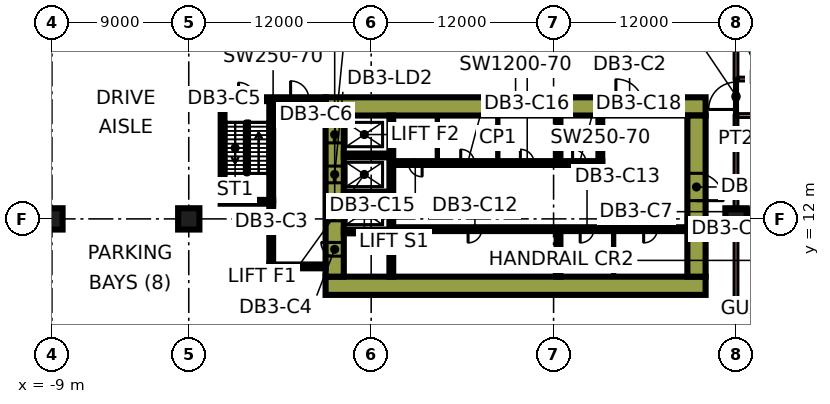
"""IFC4 building model, lengths in metres.
Left out: names, types, materials, properties, quantities, classifications, styles, units other than length and angle.
Written with IfcOpenShell. Run it as: python <this file> out.ifc"""

import sys

from ifc_helpers import new_model, si_unit, direction, frame, frame_2d, origin, origin_2d, place, context, subcontext, project, spatial, rectangle, extrude, element, fill, save


model = new_model("IFC4")
c1 = context("Model", 3, precision=1e-05, world=origin(), true_north=direction((0.0, 1.0)))
c2 = subcontext(c1, "Body", "Model", "MODEL_VIEW")
j1 = project(units=[si_unit("LENGTHUNIT", "METRE"), si_unit("PLANEANGLEUNIT", "RADIAN")], contexts=[c1])
p1 = place(None, origin())
s1 = spatial("IfcSite", under=j1, at=p1, CompositionType="ELEMENT")
p2 = place(p1, origin())
s2 = spatial("IfcBuilding", under=s1, at=p2, CompositionType="ELEMENT")
p3 = place(p2, frame((0.0, 0.0, -13.5)))
s3 = spatial("IfcBuildingStorey", under=s2, at=p3, CompositionType="ELEMENT", Elevation=-13.5)
for number, where, z_axis, x_axis in (
    (1, (-9.0, 12.0, 0.0), (0.0, 0.0, 1.0), (1.0, 0.0, 0.0)),
    (2, (0.0, 12.0, 0.0), (0.0, 0.0, 1.0), (1.0, 0.0, 0.0)),
    (3, (36.0, 12.0, 0.0), (0.0, 0.0, 1.0), (1.0, 0.0, 0.0)),
):
    element("IfcColumn", number, at=place(p3, frame(where, z_axis=z_axis, x_axis=x_axis)), inside=s3, PredefinedType="COLUMN", context=c2, shape_type="SweptSolid", body=[
        extrude(rectangle(XDim=1.4, YDim=1.4, at=origin_2d()), origin(), (0.0, 0.0, 1.0), 4.5),
    ])
p4 = place(p3, frame((9.0, 7.6, 0.0), z_axis=(0.0, 0.0, 1.0), x_axis=(1.0, 0.0, 0.0)))
e4 = element("IfcWall", 4, at=p4, inside=s3, PredefinedType="SHEAR", context=c2, shape_type="SweptSolid", body=[
    extrude(rectangle(XDim=25.0, YDim=1.2, at=frame_2d((12.5, 0.0))), origin(), (0.0, 0.0, 1.0), 4.5),
])
p5 = place(p3, frame((9.0, 19.4, 0.0), z_axis=(0.0, 0.0, 1.0), x_axis=(1.0, 0.0, 0.0)))
e5 = element("IfcWall", 5, at=p5, inside=s3, PredefinedType="SHEAR", context=c2, shape_type="SweptSolid", body=[
    extrude(rectangle(XDim=25.0, YDim=1.2, at=frame_2d((12.5, 0.0))), origin(), (0.0, 0.0, 1.0), 4.5),
])
p6 = place(p5, frame((19.1, 0.0, 0.0)))
e6 = element("IfcOpeningElement", 6, at=p6, cuts=e5, PredefinedType="OPENING", context=c2, shape_type="SweptSolid", body=[
    extrude(rectangle(XDim=1.8, YDim=2.4, at=frame_2d((0.9, 1.2))), frame((0.0, 0.61, 0.0), z_axis=(0.0, -1.0, 0.0), x_axis=(1.0, 0.0, 0.0)), (0.0, 0.0, 1.0), 1.22),
])
p7 = place(p3, frame((9.6, 8.2, 0.0), z_axis=(0.0, 0.0, 1.0), x_axis=(0.0, 1.0, 0.0)))
e7 = element("IfcWall", 7, at=p7, inside=s3, PredefinedType="SHEAR", context=c2, shape_type="SweptSolid", body=[
    extrude(rectangle(XDim=10.6, YDim=1.2, at=frame_2d((5.3, 0.0))), origin(), (0.0, 0.0, 1.0), 4.5),
])
p8 = place(p7, frame((3.675, 0.0, 0.0)))
e8 = element("IfcOpeningElement", 8, at=p8, cuts=e7, PredefinedType="OPENING", context=c2, shape_type="SweptSolid", body=[
    extrude(rectangle(XDim=1.1, YDim=2.2, at=frame_2d((0.55, 1.1))), frame((0.0, 0.61, 0.0), z_axis=(0.0, -1.0, 0.0), x_axis=(1.0, 0.0, 0.0)), (0.0, 0.0, 1.0), 1.22),
])
p9 = place(p7, frame((6.175, 0.0, 0.0)))
e9 = element("IfcOpeningElement", 9, at=p9, cuts=e7, PredefinedType="OPENING", context=c2, shape_type="SweptSolid", body=[
    extrude(rectangle(XDim=1.1, YDim=2.2, at=frame_2d((0.55, 1.1))), frame((0.0, 0.61, 0.0), z_axis=(0.0, -1.0, 0.0), x_axis=(1.0, 0.0, 0.0)), (0.0, 0.0, 1.0), 1.22),
])
p10 = place(p7, frame((8.8, 0.0, 0.0)))
e10 = element("IfcOpeningElement", 10, at=p10, cuts=e7, PredefinedType="OPENING", context=c2, shape_type="SweptSolid", body=[
    extrude(rectangle(XDim=1.1, YDim=2.2, at=frame_2d((0.55, 1.1))), frame((0.0, 0.61, 0.0), z_axis=(0.0, -1.0, 0.0), x_axis=(1.0, 0.0, 0.0)), (0.0, 0.0, 1.0), 1.22),
])
p11 = place(p7, frame((1.35, 0.0, 0.0)))
e11 = element("IfcOpeningElement", 11, at=p11, cuts=e7, PredefinedType="OPENING", context=c2, shape_type="SweptSolid", body=[
    extrude(rectangle(XDim=0.9, YDim=2.1, at=frame_2d((0.45, 1.05))), frame((0.0, 0.61, 0.0), z_axis=(0.0, -1.0, 0.0), x_axis=(1.0, 0.0, 0.0)), (0.0, 0.0, 1.0), 1.22),
])
p12 = place(p3, frame((33.4, 8.2, 0.0), z_axis=(0.0, 0.0, 1.0), x_axis=(0.0, 1.0, 0.0)))
e12 = element("IfcWall", 12, at=p12, inside=s3, PredefinedType="SHEAR", context=c2, shape_type="SweptSolid", body=[
    extrude(rectangle(XDim=10.6, YDim=1.2, at=frame_2d((5.3, 0.0))), origin(), (0.0, 0.0, 1.0), 4.5),
])
p13 = place(p12, frame((5.0, 0.0, 0.0)))
e13 = element("IfcOpeningElement", 13, at=p13, cuts=e12, PredefinedType="OPENING", context=c2, shape_type="SweptSolid", body=[
    extrude(rectangle(XDim=1.8, YDim=2.4, at=frame_2d((0.9, 1.2))), frame((0.0, 0.61, 0.0), z_axis=(0.0, -1.0, 0.0), x_axis=(1.0, 0.0, 0.0)), (0.0, 0.0, 1.0), 1.22),
])
p14 = place(p3, frame((13.325, 8.2, 0.0), z_axis=(0.0, 0.0, 1.0), x_axis=(0.0, 1.0, 0.0)))
e14 = element("IfcWall", 14, at=p14, inside=s3, PredefinedType="SHEAR", context=c2, shape_type="SweptSolid", body=[
    extrude(rectangle(XDim=10.6, YDim=0.25, at=frame_2d((5.3, 0.0))), origin(), (0.0, 0.0, 1.0), 4.5),
])
p15 = place(p3, frame((13.45, 11.325, 0.0), z_axis=(0.0, 0.0, 1.0), x_axis=(1.0, 0.0, 0.0)))
e15 = element("IfcWall", 15, at=p15, inside=s3, PredefinedType="SHEAR", context=c2, shape_type="SweptSolid", body=[
    extrude(rectangle(XDim=19.35, YDim=0.25, at=frame_2d((9.675, 0.0))), origin(), (0.0, 0.0, 1.0), 4.5),
])
p16 = place(p15, frame((4.925, 0.0, 0.0)))
e16 = element("IfcOpeningElement", 16, at=p16, cuts=e15, PredefinedType="OPENING", context=c2, shape_type="SweptSolid", body=[
    extrude(rectangle(XDim=0.9, YDim=2.1, at=frame_2d((0.45, 1.05))), frame((0.0, 0.135, 0.0), z_axis=(0.0, -1.0, 0.0), x_axis=(1.0, 0.0, 0.0)), (0.0, 0.0, 1.0), 0.27),
])
p17 = place(p15, frame((12.3, 0.0, 0.0)))
e17 = element("IfcOpeningElement", 17, at=p17, cuts=e15, PredefinedType="OPENING", context=c2, shape_type="SweptSolid", body=[
    extrude(rectangle(XDim=0.9, YDim=2.1, at=frame_2d((0.45, 1.05))), frame((0.0, 0.135, 0.0), z_axis=(0.0, -1.0, 0.0), x_axis=(1.0, 0.0, 0.0)), (0.0, 0.0, 1.0), 0.27),
])
p18 = place(p15, frame((16.475, 0.0, 0.0)))
e18 = element("IfcOpeningElement", 18, at=p18, cuts=e15, PredefinedType="OPENING", context=c2, shape_type="SweptSolid", body=[
    extrude(rectangle(XDim=0.9, YDim=2.1, at=frame_2d((0.45, 1.05))), frame((0.0, 0.135, 0.0), z_axis=(0.0, -1.0, 0.0), x_axis=(1.0, 0.0, 0.0)), (0.0, 0.0, 1.0), 0.27),
])
p19 = place(p3, frame((13.45, 15.675, 0.0), z_axis=(0.0, 0.0, 1.0), x_axis=(1.0, 0.0, 0.0)))
e19 = element("IfcWall", 19, at=p19, inside=s3, PredefinedType="SHEAR", context=c2, shape_type="SweptSolid", body=[
    extrude(rectangle(XDim=13.75, YDim=0.25, at=frame_2d((6.875, 0.0))), origin(), (0.0, 0.0, 1.0), 4.5),
])
p20 = place(p19, frame((1.001, 0.0, 0.0)))
e20 = element("IfcOpeningElement", 20, at=p20, cuts=e19, PredefinedType="OPENING", context=c2, shape_type="SweptSolid", body=[
    extrude(rectangle(XDim=0.9, YDim=2.1, at=frame_2d((0.45, 1.05))), frame((0.0, 0.135, 0.0), z_axis=(0.0, -1.0, 0.0), x_axis=(1.0, 0.0, 0.0)), (0.0, 0.0, 1.0), 0.27),
])
p21 = place(p19, frame((4.441, 0.0, 0.0)))
e21 = element("IfcOpeningElement", 21, at=p21, cuts=e19, PredefinedType="OPENING", context=c2, shape_type="SweptSolid", body=[
    extrude(rectangle(XDim=0.9, YDim=2.1, at=frame_2d((0.45, 1.05))), frame((0.0, 0.135, 0.0), z_axis=(0.0, -1.0, 0.0), x_axis=(1.0, 0.0, 0.0)), (0.0, 0.0, 1.0), 0.27),
])
p22 = place(p19, frame((8.365, 0.0, 0.0)))
e22 = element("IfcOpeningElement", 22, at=p22, cuts=e19, PredefinedType="OPENING", context=c2, shape_type="SweptSolid", body=[
    extrude(rectangle(XDim=0.9, YDim=2.1, at=frame_2d((0.45, 1.05))), frame((0.0, 0.135, 0.0), z_axis=(0.0, -1.0, 0.0), x_axis=(1.0, 0.0, 0.0)), (0.0, 0.0, 1.0), 0.27),
])
p23 = place(p19, frame((11.8, 0.0, 0.0)))
e23 = element("IfcOpeningElement", 23, at=p23, cuts=e19, PredefinedType="OPENING", context=c2, shape_type="SweptSolid", body=[
    extrude(rectangle(XDim=0.9, YDim=2.1, at=frame_2d((0.45, 1.05))), frame((0.0, 0.135, 0.0), z_axis=(0.0, -1.0, 0.0), x_axis=(1.0, 0.0, 0.0)), (0.0, 0.0, 1.0), 0.27),
])
for number, where, z_axis, x_axis in (
    (24, (10.2, 11.175, 0.0), (0.0, 0.0, 1.0), (1.0, 0.0, 0.0)),
    (25, (10.2, 13.675, 0.0), (0.0, 0.0, 1.0), (1.0, 0.0, 0.0)),
    (26, (10.2, 16.175, 0.0), (0.0, 0.0, 1.0), (1.0, 0.0, 0.0)),
    (27, (24.325, 8.2, 0.0), (0.0, 0.0, 1.0), (0.0, 1.0, 0.0)),
    (28, (24.325, 15.8, 0.0), (0.0, 0.0, 1.0), (0.0, 1.0, 0.0)),
    (29, (27.075, 15.8, 0.0), (0.0, 0.0, 1.0), (0.0, 1.0, 0.0)),
):
    element("IfcWall", number, at=place(p3, frame(where, z_axis=z_axis, x_axis=x_axis)), inside=s3, PredefinedType="SHEAR", context=c2, shape_type="SweptSolid", body=[
        extrude(rectangle(XDim=3.0, YDim=0.25, at=frame_2d((1.5, 0.0))), origin(), (0.0, 0.0, 1.0), 4.5),
    ])
p24 = place(p3, frame((2.1, 19.875, 0.0), z_axis=(0.0, 0.0, 1.0), x_axis=(1.0, 0.0, 0.0)))
e30 = element("IfcWall", 30, at=p24, inside=s3, PredefinedType="SHEAR", context=c2, shape_type="SweptSolid", body=[
    extrude(rectangle(XDim=6.9, YDim=0.25, at=frame_2d((3.45, 0.0))), origin(), (0.0, 0.0, 1.0), 4.5),
])
p25 = place(p24, frame((1.175, 0.0, 0.0)))
e31 = element("IfcOpeningElement", 31, at=p25, cuts=e30, PredefinedType="OPENING", context=c2, shape_type="SweptSolid", body=[
    extrude(rectangle(XDim=1.1, YDim=2.2, at=frame_2d((0.55, 1.1))), frame((0.0, 0.135, 0.0), z_axis=(0.0, -1.0, 0.0), x_axis=(1.0, 0.0, 0.0)), (0.0, 0.0, 1.0), 0.27),
])
p26 = place(p24, frame((4.6, 0.0, 0.0)))
e32 = element("IfcOpeningElement", 32, at=p26, cuts=e30, PredefinedType="OPENING", context=c2, shape_type="SweptSolid", body=[
    extrude(rectangle(XDim=1.2, YDim=2.2, at=frame_2d((0.6, 1.1))), frame((0.0, 0.135, 0.0), z_axis=(0.0, -1.0, 0.0), x_axis=(1.0, 0.0, 0.0)), (0.0, 0.0, 1.0), 0.27),
])
p27 = place(p3, frame((2.1, 13.125, 0.0), z_axis=(0.0, 0.0, 1.0), x_axis=(1.0, 0.0, 0.0)))
e33 = element("IfcWall", 33, at=p27, inside=s3, PredefinedType="SHEAR", context=c2, shape_type="SweptSolid", body=[
    extrude(rectangle(XDim=3.45, YDim=0.25, at=frame_2d((1.725, 0.0))), origin(), (0.0, 0.0, 1.0), 4.5),
])
p28 = place(p3, frame((2.225, 13.25, 0.0), z_axis=(0.0, 0.0, 1.0), x_axis=(0.0, 1.0, 0.0)))
e34 = element("IfcWall", 34, at=p28, inside=s3, PredefinedType="SHEAR", context=c2, shape_type="SweptSolid", body=[
    extrude(rectangle(XDim=6.5, YDim=0.25, at=frame_2d((3.25, 0.0))), origin(), (0.0, 0.0, 1.0), 4.5),
])
p29 = place(p3, frame((5.425, 13.25, 0.0), z_axis=(0.0, 0.0, 1.0), x_axis=(0.0, 1.0, 0.0)))
e35 = element("IfcWall", 35, at=p29, inside=s3, PredefinedType="SHEAR", context=c2, shape_type="SweptSolid", body=[
    extrude(rectangle(XDim=6.5, YDim=0.25, at=frame_2d((3.25, 0.0))), origin(), (0.0, 0.0, 1.0), 4.5),
])
p30 = place(p29, frame((5.25, 0.0, 0.0)))
e36 = element("IfcOpeningElement", 36, at=p30, cuts=e35, PredefinedType="OPENING", context=c2, shape_type="SweptSolid", body=[
    extrude(rectangle(XDim=1.1, YDim=2.2, at=frame_2d((0.55, 1.1))), frame((0.0, 0.135, 0.0), z_axis=(0.0, -1.0, 0.0), x_axis=(1.0, 0.0, 0.0)), (0.0, 0.0, 1.0), 0.27),
])
p31 = place(p3, frame((5.3, 8.875, 0.0), z_axis=(0.0, 0.0, 1.0), x_axis=(1.0, 0.0, 0.0)))
e37 = element("IfcWall", 37, at=p31, inside=s3, PredefinedType="SHEAR", context=c2, shape_type="SweptSolid", body=[
    extrude(rectangle(XDim=3.7, YDim=0.25, at=frame_2d((1.85, 0.0))), origin(), (0.0, 0.0, 1.0), 4.5),
])
p32 = place(p3, frame((5.425, 9.0, 0.0), z_axis=(0.0, 0.0, 1.0), x_axis=(0.0, 1.0, 0.0)))
e38 = element("IfcWall", 38, at=p32, inside=s3, PredefinedType="SHEAR", context=c2, shape_type="SweptSolid", body=[
    extrude(rectangle(XDim=4.0, YDim=0.25, at=frame_2d((2.0, 0.0))), origin(), (0.0, 0.0, 1.0), 4.5),
])
p33 = place(p3, frame((36.7, 12.475, 0.0), z_axis=(0.0, 0.0, 1.0), x_axis=(1.0, 0.0, 0.0)))
e39 = element("IfcWall", 39, at=p33, inside=s3, PredefinedType="SHEAR", context=c2, shape_type="SweptSolid", body=[
    extrude(rectangle(XDim=3.95, YDim=0.25, at=frame_2d((1.975, 0.0))), origin(), (0.0, 0.0, 1.0), 4.5),
])
p34 = place(p33, frame((1.675, 0.0, 0.0)))
e40 = element("IfcOpeningElement", 40, at=p34, cuts=e39, PredefinedType="OPENING", context=c2, shape_type="SweptSolid", body=[
    extrude(rectangle(XDim=1.1, YDim=2.2, at=frame_2d((0.55, 1.1))), frame((0.0, 0.135, 0.0), z_axis=(0.0, -1.0, 0.0), x_axis=(1.0, 0.0, 0.0)), (0.0, 0.0, 1.0), 0.27),
])
for number, where, z_axis, x_axis in (
    (41, (27.95, 8.2, 0.0), (0.0, 0.0, 1.0), (0.0, 1.0, 0.0)),
    (42, (16.353, 15.8, 0.0), (0.0, 0.0, 1.0), (0.0, 1.0, 0.0)),
    (43, (20.33, 15.8, 0.0), (0.0, 0.0, 1.0), (0.0, 1.0, 0.0)),
):
    element("IfcWall", number, at=place(p3, frame(where, z_axis=z_axis, x_axis=x_axis)), inside=s3, PredefinedType="PARTITIONING", context=c2, shape_type="SweptSolid", body=[
        extrude(rectangle(XDim=3.0, YDim=0.15, at=frame_2d((1.5, 0.0))), origin(), (0.0, 0.0, 1.0), 4.05),
    ])
p35 = place(p3, frame((36.0, 5.875, 0.0), z_axis=(0.0, 0.0, 1.0), x_axis=(0.0, 1.0, 0.0)))
e44 = element("IfcWall", 44, at=p35, inside=s3, PredefinedType="PARTITIONING", context=c2, shape_type="SweptSolid", body=[
    extrude(rectangle(XDim=5.426, YDim=0.25, at=frame_2d((2.713, 0.0))), origin(), (0.0, 0.0, 1.0), 4.05),
])
p36 = place(p3, frame((36.0, 12.699, 0.0), z_axis=(0.0, 0.0, 1.0), x_axis=(0.0, 1.0, 0.0)))
e45 = element("IfcWall", 45, at=p36, inside=s3, PredefinedType="PARTITIONING", context=c2, shape_type="SweptSolid", body=[
    extrude(rectangle(XDim=6.101, YDim=0.25, at=frame_2d((3.051, 0.0))), origin(), (0.0, 0.0, 1.0), 4.05),
])
p37 = place(p3, frame((36.0, 18.8, 0.0), z_axis=(0.0, 0.0, 1.0), x_axis=(0.0, 1.0, 0.0)))
e46 = element("IfcWall", 46, at=p37, inside=s3, PredefinedType="PARTITIONING", context=c2, shape_type="SweptSolid", body=[
    extrude(rectangle(XDim=2.4, YDim=0.2, at=frame_2d((1.2, 0.0))), origin(), (0.0, 0.0, 1.0), 4.05),
])
p38 = place(p37, frame((0.4, 0.0, 0.0)))
e47 = element("IfcOpeningElement", 47, at=p38, cuts=e46, PredefinedType="OPENING", context=c2, shape_type="SweptSolid", body=[
    extrude(rectangle(XDim=1.8, YDim=2.1, at=frame_2d((0.9, 1.05))), frame((0.0, 0.11, 0.0), z_axis=(0.0, -1.0, 0.0), x_axis=(1.0, 0.0, 0.0)), (0.0, 0.0, 1.0), 0.22),
])
p39 = place(p3, frame((36.0, 21.2, 0.0), z_axis=(0.0, 0.0, 1.0), x_axis=(0.0, 1.0, 0.0)))
e48 = element("IfcWall", 48, at=p39, inside=s3, PredefinedType="PARTITIONING", context=c2, shape_type="SweptSolid", body=[
    extrude(rectangle(XDim=2.101, YDim=0.25, at=frame_2d((1.051, 0.0))), origin(), (0.0, 0.0, 1.0), 4.05),
])
p40 = place(p3, frame((36.125, 6.0, 0.0), z_axis=(0.0, 0.0, 1.0), x_axis=(1.0, 0.0, 0.0)))
e49 = element("IfcWall", 49, at=p40, inside=s3, PredefinedType="PARTITIONING", context=c2, shape_type="SweptSolid", body=[
    extrude(rectangle(XDim=1.075, YDim=0.25, at=frame_2d((0.538, 0.0))), origin(), (0.0, 0.0, 1.0), 4.05),
])
p41 = place(p3, frame((36.125, 18.8, 0.0), z_axis=(0.0, 0.0, 1.0), x_axis=(1.0, 0.0, 0.0)))
e50 = element("IfcWall", 50, at=p41, inside=s3, PredefinedType="PARTITIONING", context=c2, shape_type="SweptSolid", body=[
    extrude(rectangle(XDim=5.375, YDim=0.25, at=frame_2d((2.688, 0.0))), origin(), (0.0, 0.0, 1.0), 4.05),
])
p42 = place(p41, frame((2.025, 0.0, 0.0)))
e51 = element("IfcOpeningElement", 51, at=p42, cuts=e50, PredefinedType="OPENING", context=c2, shape_type="SweptSolid", body=[
    extrude(rectangle(XDim=1.2, YDim=2.1, at=frame_2d((0.6, 1.05))), frame((0.0, 0.135, 0.0), z_axis=(0.0, -1.0, 0.0), x_axis=(1.0, 0.0, 0.0)), (0.0, 0.0, 1.0), 0.27),
])
p43 = place(p3, frame((36.125, 21.2, 0.0), z_axis=(0.0, 0.0, 1.0), x_axis=(1.0, 0.0, 0.0)))
e52 = element("IfcWall", 52, at=p43, inside=s3, PredefinedType="PARTITIONING", context=c2, shape_type="SweptSolid", body=[
    extrude(rectangle(XDim=5.375, YDim=0.25, at=frame_2d((2.688, 0.0))), origin(), (0.0, 0.0, 1.0), 4.05),
])
p44 = place(p43, frame((2.025, 0.0, 0.0)))
e53 = element("IfcOpeningElement", 53, at=p44, cuts=e52, PredefinedType="OPENING", context=c2, shape_type="SweptSolid", body=[
    extrude(rectangle(XDim=1.2, YDim=2.1, at=frame_2d((0.6, 1.05))), frame((0.0, 0.135, 0.0), z_axis=(0.0, -1.0, 0.0), x_axis=(1.0, 0.0, 0.0)), (0.0, 0.0, 1.0), 0.27),
])
p45 = place(p8, origin())
e54 = element("IfcDoor", 54, at=p45, inside=s3, OperationType="DOUBLE_DOOR_SLIDING", PredefinedType="DOOR", context=c2, shape_type="SweptSolid", body=[
    extrude(rectangle(XDim=1.1, YDim=2.2, at=frame_2d((0.55, 1.1))), frame((0.0, 0.025, 0.0), z_axis=(0.0, -1.0, 0.0), x_axis=(1.0, 0.0, 0.0)), (0.0, 0.0, 1.0), 0.05),
])
fill(e8, e54)
p46 = place(p9, origin())
e55 = element("IfcDoor", 55, at=p46, inside=s3, OperationType="DOUBLE_DOOR_SLIDING", PredefinedType="DOOR", context=c2, shape_type="SweptSolid", body=[
    extrude(rectangle(XDim=1.1, YDim=2.2, at=frame_2d((0.55, 1.1))), frame((0.0, 0.025, 0.0), z_axis=(0.0, -1.0, 0.0), x_axis=(1.0, 0.0, 0.0)), (0.0, 0.0, 1.0), 0.05),
])
fill(e9, e55)
p47 = place(p10, origin())
e56 = element("IfcDoor", 56, at=p47, inside=s3, OperationType="DOUBLE_DOOR_SLIDING", PredefinedType="DOOR", context=c2, shape_type="SweptSolid", body=[
    extrude(rectangle(XDim=1.1, YDim=2.2, at=frame_2d((0.55, 1.1))), frame((0.0, 0.025, 0.0), z_axis=(0.0, -1.0, 0.0), x_axis=(1.0, 0.0, 0.0)), (0.0, 0.0, 1.0), 0.05),
])
fill(e10, e56)
p48 = place(p13, frame((1.8, 0.0, 0.0), z_axis=(0.0, 0.0, 1.0), x_axis=(-1.0, 0.0, 0.0)))
e57 = element("IfcDoor", 57, at=p48, inside=s3, OperationType="DOUBLE_DOOR_SINGLE_SWING", PredefinedType="DOOR", context=c2, shape_type="SweptSolid", body=[
    extrude(rectangle(XDim=1.8, YDim=2.4, at=frame_2d((0.9, 1.2))), frame((0.0, 0.025, 0.0), z_axis=(0.0, -1.0, 0.0), x_axis=(1.0, 0.0, 0.0)), (0.0, 0.0, 1.0), 0.05),
])
fill(e13, e57)
p49 = place(p6, origin())
e58 = element("IfcDoor", 58, at=p49, inside=s3, OperationType="DOUBLE_DOOR_SINGLE_SWING", PredefinedType="DOOR", context=c2, shape_type="SweptSolid", body=[
    extrude(rectangle(XDim=1.8, YDim=2.4, at=frame_2d((0.9, 1.2))), frame((0.0, 0.025, 0.0), z_axis=(0.0, -1.0, 0.0), x_axis=(1.0, 0.0, 0.0)), (0.0, 0.0, 1.0), 0.05),
])
fill(e6, e58)
p50 = place(p30, origin())
e59 = element("IfcDoor", 59, at=p50, inside=s3, OperationType="SINGLE_SWING_RIGHT", PredefinedType="DOOR", context=c2, shape_type="SweptSolid", body=[
    extrude(rectangle(XDim=1.1, YDim=2.2, at=frame_2d((0.55, 1.1))), frame((0.0, 0.025, 0.0), z_axis=(0.0, -1.0, 0.0), x_axis=(1.0, 0.0, 0.0)), (0.0, 0.0, 1.0), 0.05),
])
fill(e36, e59)
p51 = place(p11, frame((0.9, 0.0, 0.0), z_axis=(0.0, 0.0, 1.0), x_axis=(-1.0, 0.0, 0.0)))
e60 = element("IfcDoor", 60, at=p51, inside=s3, OperationType="SINGLE_SWING_RIGHT", PredefinedType="DOOR", context=c2, shape_type="SweptSolid", body=[
    extrude(rectangle(XDim=0.9, YDim=2.1, at=frame_2d((0.45, 1.05))), frame((0.0, 0.025, 0.0), z_axis=(0.0, -1.0, 0.0), x_axis=(1.0, 0.0, 0.0)), (0.0, 0.0, 1.0), 0.05),
])
fill(e11, e60)
p52 = place(p25, origin())
e61 = element("IfcDoor", 61, at=p52, inside=s3, OperationType="SINGLE_SWING_LEFT", PredefinedType="DOOR", context=c2, shape_type="SweptSolid", body=[
    extrude(rectangle(XDim=1.1, YDim=2.2, at=frame_2d((0.55, 1.1))), frame((0.0, 0.025, 0.0), z_axis=(0.0, -1.0, 0.0), x_axis=(1.0, 0.0, 0.0)), (0.0, 0.0, 1.0), 0.05),
])
fill(e31, e61)
p53 = place(p26, origin())
e62 = element("IfcDoor", 62, at=p53, inside=s3, OperationType="SINGLE_SWING_LEFT", PredefinedType="DOOR", context=c2, shape_type="SweptSolid", body=[
    extrude(rectangle(XDim=1.2, YDim=2.2, at=frame_2d((0.6, 1.1))), frame((0.0, 0.025, 0.0), z_axis=(0.0, -1.0, 0.0), x_axis=(1.0, 0.0, 0.0)), (0.0, 0.0, 1.0), 0.05),
])
fill(e32, e62)
p54 = place(p16, frame((0.9, 0.0, 0.0), z_axis=(0.0, 0.0, 1.0), x_axis=(-1.0, 0.0, 0.0)))
e63 = element("IfcDoor", 63, at=p54, inside=s3, OperationType="SINGLE_SWING_LEFT", PredefinedType="DOOR", context=c2, shape_type="SweptSolid", body=[
    extrude(rectangle(XDim=0.9, YDim=2.1, at=frame_2d((0.45, 1.05))), frame((0.0, 0.025, 0.0), z_axis=(0.0, -1.0, 0.0), x_axis=(1.0, 0.0, 0.0)), (0.0, 0.0, 1.0), 0.05),
])
fill(e16, e63)
p55 = place(p17, frame((0.9, 0.0, 0.0), z_axis=(0.0, 0.0, 1.0), x_axis=(-1.0, 0.0, 0.0)))
e64 = element("IfcDoor", 64, at=p55, inside=s3, OperationType="SINGLE_SWING_LEFT", PredefinedType="DOOR", context=c2, shape_type="SweptSolid", body=[
    extrude(rectangle(XDim=0.9, YDim=2.1, at=frame_2d((0.45, 1.05))), frame((0.0, 0.025, 0.0), z_axis=(0.0, -1.0, 0.0), x_axis=(1.0, 0.0, 0.0)), (0.0, 0.0, 1.0), 0.05),
])
fill(e17, e64)
p56 = place(p18, frame((0.9, 0.0, 0.0), z_axis=(0.0, 0.0, 1.0), x_axis=(-1.0, 0.0, 0.0)))
e65 = element("IfcDoor", 65, at=p56, inside=s3, OperationType="SINGLE_SWING_LEFT", PredefinedType="DOOR", context=c2, shape_type="SweptSolid", body=[
    extrude(rectangle(XDim=0.9, YDim=2.1, at=frame_2d((0.45, 1.05))), frame((0.0, 0.025, 0.0), z_axis=(0.0, -1.0, 0.0), x_axis=(1.0, 0.0, 0.0)), (0.0, 0.0, 1.0), 0.05),
])
fill(e18, e65)
p57 = place(p20, origin())
e66 = element("IfcDoor", 66, at=p57, inside=s3, OperationType="SINGLE_SWING_RIGHT", PredefinedType="DOOR", context=c2, shape_type="SweptSolid", body=[
    extrude(rectangle(XDim=0.9, YDim=2.1, at=frame_2d((0.45, 1.05))), frame((0.0, 0.025, 0.0), z_axis=(0.0, -1.0, 0.0), x_axis=(1.0, 0.0, 0.0)), (0.0, 0.0, 1.0), 0.05),
])
fill(e20, e66)
p58 = place(p21, origin())
e67 = element("IfcDoor", 67, at=p58, inside=s3, OperationType="SINGLE_SWING_LEFT", PredefinedType="DOOR", context=c2, shape_type="SweptSolid", body=[
    extrude(rectangle(XDim=0.9, YDim=2.1, at=frame_2d((0.45, 1.05))), frame((0.0, 0.025, 0.0), z_axis=(0.0, -1.0, 0.0), x_axis=(1.0, 0.0, 0.0)), (0.0, 0.0, 1.0), 0.05),
])
fill(e21, e67)
p59 = place(p22, origin())
e68 = element("IfcDoor", 68, at=p59, inside=s3, OperationType="SINGLE_SWING_LEFT", PredefinedType="DOOR", context=c2, shape_type="SweptSolid", body=[
    extrude(rectangle(XDim=0.9, YDim=2.1, at=frame_2d((0.45, 1.05))), frame((0.0, 0.025, 0.0), z_axis=(0.0, -1.0, 0.0), x_axis=(1.0, 0.0, 0.0)), (0.0, 0.0, 1.0), 0.05),
])
fill(e22, e68)
p60 = place(p23, origin())
e69 = element("IfcDoor", 69, at=p60, inside=s3, OperationType="SINGLE_SWING_LEFT", PredefinedType="DOOR", context=c2, shape_type="SweptSolid", body=[
    extrude(rectangle(XDim=0.9, YDim=2.1, at=frame_2d((0.45, 1.05))), frame((0.0, 0.025, 0.0), z_axis=(0.0, -1.0, 0.0), x_axis=(1.0, 0.0, 0.0)), (0.0, 0.0, 1.0), 0.05),
])
fill(e23, e69)
p61 = place(p38, origin())
e70 = element("IfcDoor", 70, at=p61, inside=s3, OperationType="DOUBLE_DOOR_SINGLE_SWING", PredefinedType="DOOR", context=c2, shape_type="SweptSolid", body=[
    extrude(rectangle(XDim=1.8, YDim=2.1, at=frame_2d((0.9, 1.05))), frame((0.0, 0.025, 0.0), z_axis=(0.0, -1.0, 0.0), x_axis=(1.0, 0.0, 0.0)), (0.0, 0.0, 1.0), 0.05),
])
fill(e47, e70)
save(model, sys.argv[1])
